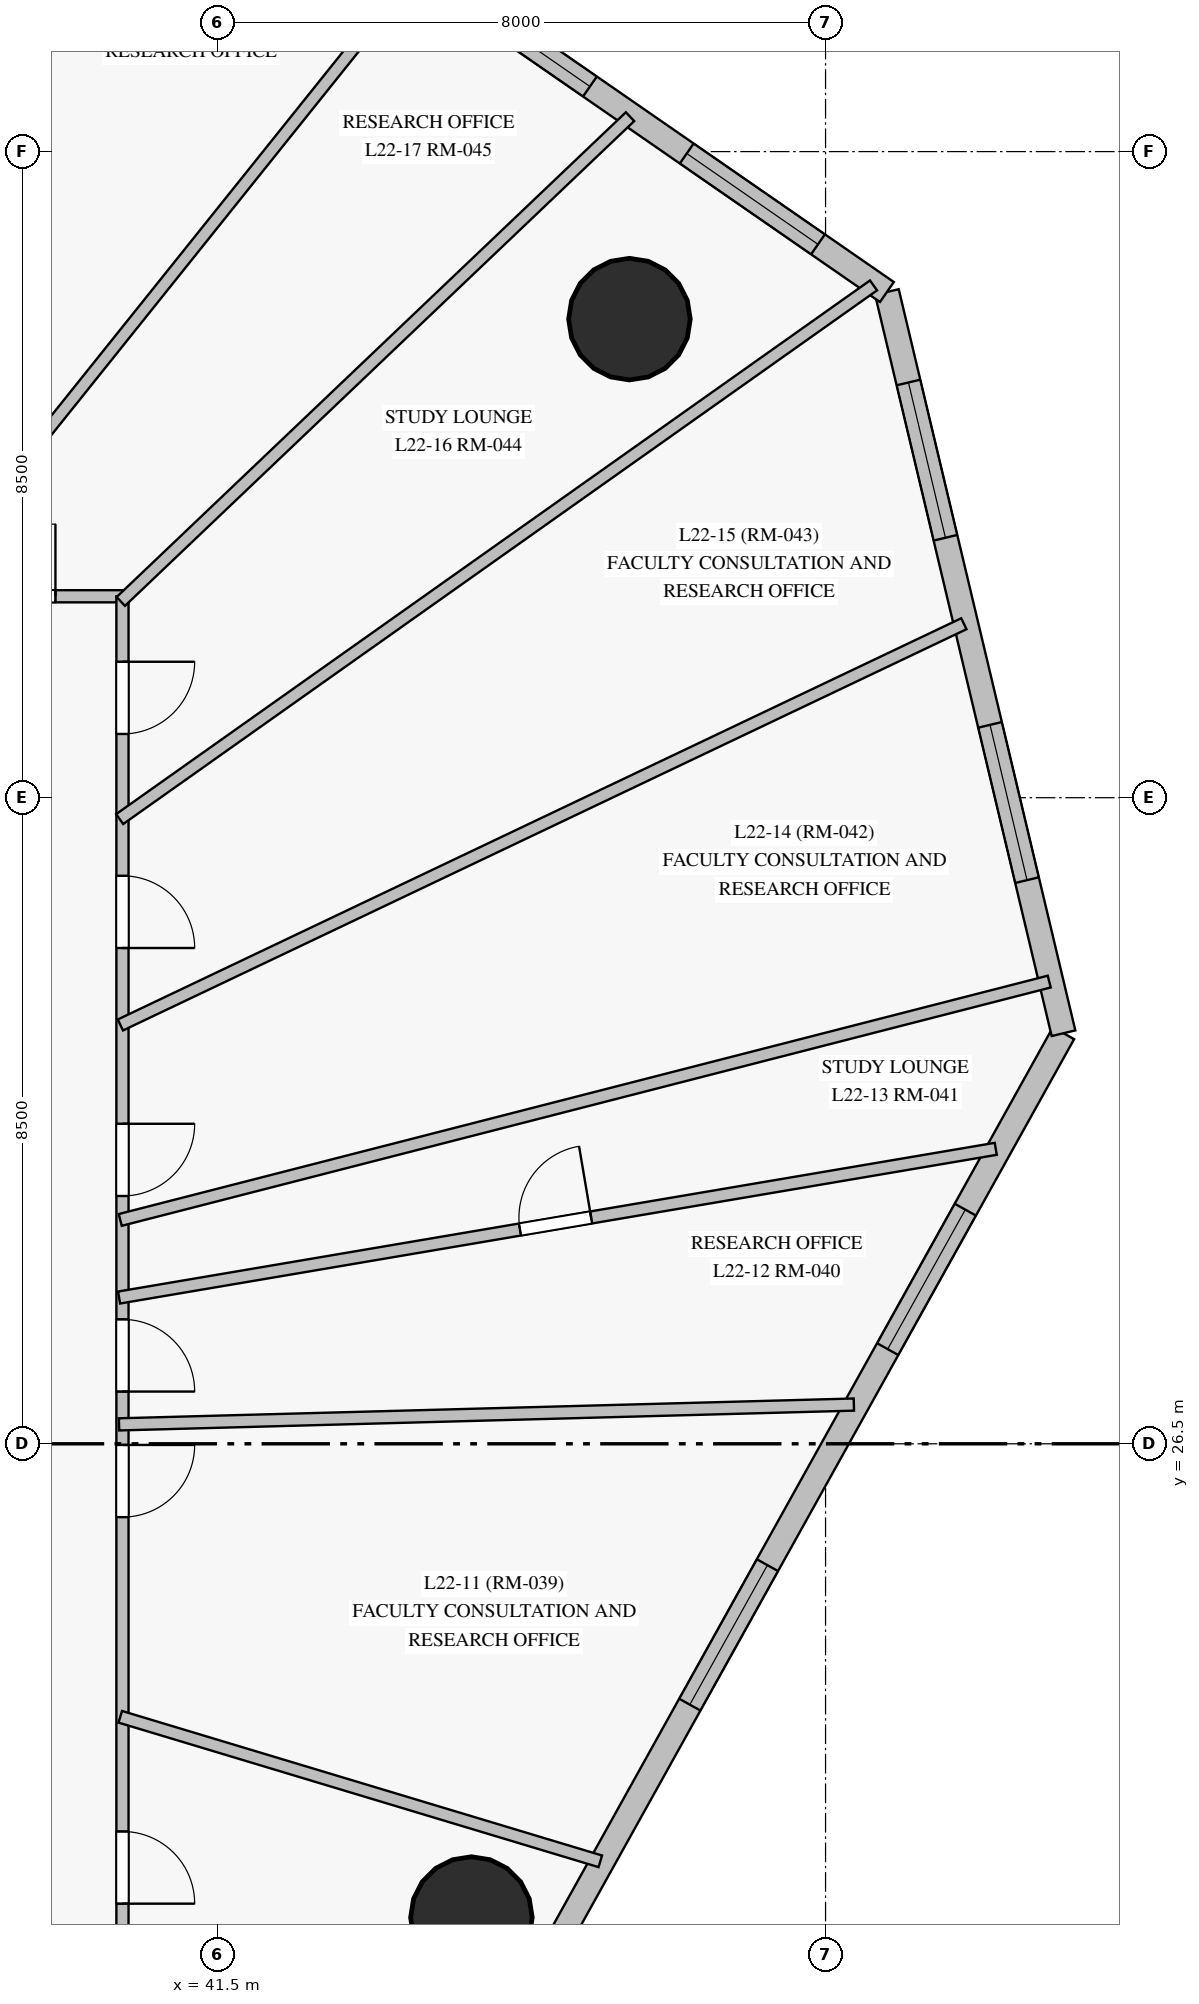
"""IFC4 building model, lengths in metres.
Left out: names, types, materials, properties, quantities, classifications, styles, units other than length and angle.
Written with IfcOpenShell. Run it as: python <this file> out.ifc"""

import sys

from ifc_helpers import new_model, si_unit, direction, frame, frame_2d, origin, origin_with_axes, origin_2d, place, context, subcontext, project, spatial, rectangle, circle, extrude, source, transform, mapped, element, fill, save


model = new_model("IFC4")
c1 = context("Model", 3, precision=1e-05, world=origin(), true_north=direction((0.0, 1.0)))
c2 = subcontext(c1, "Body", "Model", "MODEL_VIEW")
j1 = project(units=[si_unit("LENGTHUNIT", "METRE"), si_unit("PLANEANGLEUNIT", "RADIAN")], contexts=[c1])
p1 = place(None, origin())
s1 = spatial("IfcSite", under=j1, at=p1, CompositionType="ELEMENT")
p2 = place(p1, origin())
s2 = spatial("IfcBuilding", under=s1, at=p2, CompositionType="ELEMENT")
p3 = place(p2, frame((0.0, 0.0, 84.1)))
s3 = spatial("IfcBuildingStorey", under=s2, at=p3, CompositionType="ELEMENT", Elevation=84.1)
m1 = source(origin_with_axes(), c2, "Body", "SweptSolid", [
    extrude(circle(Radius=0.8, at=origin_2d()), origin(), (0.0, 0.0, 1.0), 3.6),
])
for number, where, z_axis, x_axis in (
    (1, (44.841, 20.267, 0.0), (0.0, 0.0, 1.0), (1.0, 0.0, 0.0)),
    (2, (46.92, 41.296, 0.0), (0.0, 0.0, 1.0), (1.0, 0.0, 0.0)),
):
    element("IfcColumn", number, at=place(p3, frame(where, z_axis=z_axis, x_axis=x_axis)), inside=s3, PredefinedType="COLUMN", context=c2, shape_type="MappedRepresentation", body=[
        mapped(m1, transform((0.0, 0.0, 0.0), scale=1.0)),
    ])
p4 = place(p3, frame((45.334, 18.793, 0.0), z_axis=(0.0, 0.0, 1.0), x_axis=(0.486333635772, 0.873773194094, 0.0)))
e3 = element("IfcWall", 3, at=p4, inside=s3, PredefinedType="SOLIDWALL", context=c2, shape_type="SweptSolid", body=[
    extrude(rectangle(XDim=15.002, YDim=0.32, at=frame_2d((7.501, 0.0))), origin(), (0.0, 0.0, 1.0), 3.325),
])
p5 = place(p4, frame((4.893, 0.0, 0.85)))
e4 = element("IfcOpeningElement", 4, at=p5, cuts=e3, PredefinedType="OPENING", context=c2, shape_type="SweptSolid", body=[
    extrude(rectangle(XDim=2.1, YDim=1.95, at=frame_2d((1.05, 0.975))), frame((0.0, 0.17, 0.0), z_axis=(0.0, -1.0, 0.0), x_axis=(1.0, 0.0, 0.0)), (0.0, 0.0, 1.0), 0.34),
])
p6 = place(p4, frame((10.246, 0.0, 0.85)))
e5 = element("IfcOpeningElement", 5, at=p6, cuts=e3, PredefinedType="OPENING", context=c2, shape_type="SweptSolid", body=[
    extrude(rectangle(XDim=2.1, YDim=1.95, at=frame_2d((1.05, 0.975))), frame((0.0, 0.17, 0.0), z_axis=(0.0, -1.0, 0.0), x_axis=(1.0, 0.0, 0.0)), (0.0, 0.0, 1.0), 0.34),
])
p7 = place(p3, frame((52.63, 31.901, 0.0), z_axis=(0.0, 0.0, 1.0), x_axis=(-0.231781859675, 0.97276778808, 0.0)))
e6 = element("IfcWall", 6, at=p7, inside=s3, PredefinedType="SOLIDWALL", context=c2, shape_type="SweptSolid", body=[
    extrude(rectangle(XDim=10.024, YDim=0.32, at=frame_2d((5.012, 0.0))), origin(), (0.0, 0.0, 1.0), 3.325),
])
p8 = place(p7, frame((2.07, 0.0, 0.85)))
e7 = element("IfcOpeningElement", 7, at=p8, cuts=e6, PredefinedType="OPENING", context=c2, shape_type="SweptSolid", body=[
    extrude(rectangle(XDim=2.1, YDim=1.95, at=frame_2d((1.05, 0.975))), frame((0.0, 0.17, 0.0), z_axis=(0.0, -1.0, 0.0), x_axis=(1.0, 0.0, 0.0)), (0.0, 0.0, 1.0), 0.34),
])
p9 = place(p7, frame((6.701, 0.0, 0.85)))
e8 = element("IfcOpeningElement", 8, at=p9, cuts=e6, PredefinedType="OPENING", context=c2, shape_type="SweptSolid", body=[
    extrude(rectangle(XDim=2.1, YDim=1.95, at=frame_2d((1.05, 0.975))), frame((0.0, 0.17, 0.0), z_axis=(0.0, -1.0, 0.0), x_axis=(1.0, 0.0, 0.0)), (0.0, 0.0, 1.0), 0.34),
])
p10 = place(p3, frame((50.307, 41.653, 0.0), z_axis=(0.0, 0.0, 1.0), x_axis=(-0.822301884345, 0.569051501187, 0.0)))
e9 = element("IfcWall", 9, at=p10, inside=s3, PredefinedType="SOLIDWALL", context=c2, shape_type="SweptSolid", body=[
    extrude(rectangle(XDim=12.498, YDim=0.32, at=frame_2d((6.249, 0.0))), origin(), (0.0, 0.0, 1.0), 3.325),
])
p11 = place(p10, frame((1.102, 0.0, 0.85)))
e10 = element("IfcOpeningElement", 10, at=p11, cuts=e9, PredefinedType="OPENING", context=c2, shape_type="SweptSolid", body=[
    extrude(rectangle(XDim=2.1, YDim=1.95, at=frame_2d((1.05, 0.975))), frame((0.0, 0.17, 0.0), z_axis=(0.0, -1.0, 0.0), x_axis=(1.0, 0.0, 0.0)), (0.0, 0.0, 1.0), 0.34),
])
p12 = place(p10, frame((4.751, 0.0, 0.85)))
e11 = element("IfcOpeningElement", 11, at=p12, cuts=e9, PredefinedType="OPENING", context=c2, shape_type="SweptSolid", body=[
    extrude(rectangle(XDim=2.1, YDim=1.95, at=frame_2d((1.05, 0.975))), frame((0.0, 0.17, 0.0), z_axis=(0.0, -1.0, 0.0), x_axis=(1.0, 0.0, 0.0)), (0.0, 0.0, 1.0), 0.34),
])
p13 = place(p10, frame((8.568, 0.0, 0.85)))
e12 = element("IfcOpeningElement", 12, at=p13, cuts=e9, PredefinedType="OPENING", context=c2, shape_type="SweptSolid", body=[
    extrude(rectangle(XDim=2.1, YDim=1.95, at=frame_2d((1.05, 0.975))), frame((0.0, 0.17, 0.0), z_axis=(0.0, -1.0, 0.0), x_axis=(1.0, 0.0, 0.0)), (0.0, 0.0, 1.0), 0.34),
])
p14 = place(p3, frame((10.5, 37.65, 0.0), z_axis=(0.0, 0.0, 1.0), x_axis=(1.0, 0.0, 0.0)))
e13 = element("IfcWall", 13, at=p14, inside=s3, PredefinedType="PARTITIONING", context=c2, shape_type="SweptSolid", body=[
    extrude(rectangle(XDim=29.75, YDim=0.16, at=frame_2d((14.875, 0.0))), origin(), (0.0, 0.0, 1.0), 2.725),
])
p15 = place(p14, frame((27.918, 0.0, 0.0)))
e14 = element("IfcOpeningElement", 14, at=p15, cuts=e13, PredefinedType="OPENING", context=c2, shape_type="SweptSolid", body=[
    extrude(rectangle(XDim=0.95, YDim=2.15, at=frame_2d((0.475, 1.075))), frame((0.0, 0.09, 0.0), z_axis=(0.0, -1.0, 0.0), x_axis=(1.0, 0.0, 0.0)), (0.0, 0.0, 1.0), 0.18),
])
p16 = place(p14, frame((25.129, 0.0, 0.0)))
e15 = element("IfcOpeningElement", 15, at=p16, cuts=e13, PredefinedType="OPENING", context=c2, shape_type="SweptSolid", body=[
    extrude(rectangle(XDim=0.95, YDim=2.15, at=frame_2d((0.475, 1.075))), frame((0.0, 0.09, 0.0), z_axis=(0.0, -1.0, 0.0), x_axis=(1.0, 0.0, 0.0)), (0.0, 0.0, 1.0), 0.18),
])
p17 = place(p14, frame((21.748, 0.0, 0.0)))
e16 = element("IfcOpeningElement", 16, at=p17, cuts=e13, PredefinedType="OPENING", context=c2, shape_type="SweptSolid", body=[
    extrude(rectangle(XDim=0.86, YDim=2.1, at=frame_2d((0.43, 1.05))), frame((0.0, 0.09, 0.0), z_axis=(0.0, -1.0, 0.0), x_axis=(1.0, 0.0, 0.0)), (0.0, 0.0, 1.0), 0.18),
])
p18 = place(p14, frame((20.048, 0.0, 0.0)))
e17 = element("IfcOpeningElement", 17, at=p18, cuts=e13, PredefinedType="OPENING", context=c2, shape_type="SweptSolid", body=[
    extrude(rectangle(XDim=0.95, YDim=2.15, at=frame_2d((0.475, 1.075))), frame((0.0, 0.09, 0.0), z_axis=(0.0, -1.0, 0.0), x_axis=(1.0, 0.0, 0.0)), (0.0, 0.0, 1.0), 0.18),
])
p19 = place(p14, frame((17.722, 0.0, 0.0)))
e18 = element("IfcOpeningElement", 18, at=p19, cuts=e13, PredefinedType="OPENING", context=c2, shape_type="SweptSolid", body=[
    extrude(rectangle(XDim=0.95, YDim=2.15, at=frame_2d((0.475, 1.075))), frame((0.0, 0.09, 0.0), z_axis=(0.0, -1.0, 0.0), x_axis=(1.0, 0.0, 0.0)), (0.0, 0.0, 1.0), 0.18),
])
p20 = place(p14, frame((15.906, 0.0, 0.0)))
e19 = element("IfcOpeningElement", 19, at=p20, cuts=e13, PredefinedType="OPENING", context=c2, shape_type="SweptSolid", body=[
    extrude(rectangle(XDim=0.95, YDim=2.15, at=frame_2d((0.475, 1.075))), frame((0.0, 0.09, 0.0), z_axis=(0.0, -1.0, 0.0), x_axis=(1.0, 0.0, 0.0)), (0.0, 0.0, 1.0), 0.18),
])
p21 = place(p14, frame((12.735, 0.0, 0.0)))
e20 = element("IfcOpeningElement", 20, at=p21, cuts=e13, PredefinedType="OPENING", context=c2, shape_type="SweptSolid", body=[
    extrude(rectangle(XDim=0.95, YDim=2.15, at=frame_2d((0.475, 1.075))), frame((0.0, 0.09, 0.0), z_axis=(0.0, -1.0, 0.0), x_axis=(1.0, 0.0, 0.0)), (0.0, 0.0, 1.0), 0.18),
])
p22 = place(p14, frame((10.11, 0.0, 0.0)))
e21 = element("IfcOpeningElement", 21, at=p22, cuts=e13, PredefinedType="OPENING", context=c2, shape_type="SweptSolid", body=[
    extrude(rectangle(XDim=0.95, YDim=2.15, at=frame_2d((0.475, 1.075))), frame((0.0, 0.09, 0.0), z_axis=(0.0, -1.0, 0.0), x_axis=(1.0, 0.0, 0.0)), (0.0, 0.0, 1.0), 0.18),
])
p23 = place(p14, frame((8.99, 0.0, 0.0)))
e22 = element("IfcOpeningElement", 22, at=p23, cuts=e13, PredefinedType="OPENING", context=c2, shape_type="SweptSolid", body=[
    extrude(rectangle(XDim=0.95, YDim=2.15, at=frame_2d((0.475, 1.075))), frame((0.0, 0.09, 0.0), z_axis=(0.0, -1.0, 0.0), x_axis=(1.0, 0.0, 0.0)), (0.0, 0.0, 1.0), 0.18),
])
p24 = place(p14, frame((7.897, 0.0, 0.0)))
e23 = element("IfcOpeningElement", 23, at=p24, cuts=e13, PredefinedType="OPENING", context=c2, shape_type="SweptSolid", body=[
    extrude(rectangle(XDim=0.95, YDim=2.15, at=frame_2d((0.475, 1.075))), frame((0.0, 0.09, 0.0), z_axis=(0.0, -1.0, 0.0), x_axis=(1.0, 0.0, 0.0)), (0.0, 0.0, 1.0), 0.18),
])
p25 = place(p3, frame((40.25, 37.65, 0.0), z_axis=(0.0, 0.0, 1.0), x_axis=(0.0, -1.0, 0.0)))
e24 = element("IfcWall", 24, at=p25, inside=s3, PredefinedType="PARTITIONING", context=c2, shape_type="SweptSolid", body=[
    extrude(rectangle(XDim=22.3, YDim=0.16, at=frame_2d((11.15, 0.0))), origin(), (0.0, 0.0, 1.0), 2.725),
])
p26 = place(p25, frame((16.25, 0.0, 0.0)))
e25 = element("IfcOpeningElement", 25, at=p26, cuts=e24, PredefinedType="OPENING", context=c2, shape_type="SweptSolid", body=[
    extrude(rectangle(XDim=0.95, YDim=2.15, at=frame_2d((0.475, 1.075))), frame((0.0, 0.09, 0.0), z_axis=(0.0, -1.0, 0.0), x_axis=(1.0, 0.0, 0.0)), (0.0, 0.0, 1.0), 0.18),
])
p27 = place(p25, frame((11.165, 0.0, 0.0)))
e26 = element("IfcOpeningElement", 26, at=p27, cuts=e24, PredefinedType="OPENING", context=c2, shape_type="SweptSolid", body=[
    extrude(rectangle(XDim=0.95, YDim=2.15, at=frame_2d((0.475, 1.075))), frame((0.0, 0.09, 0.0), z_axis=(0.0, -1.0, 0.0), x_axis=(1.0, 0.0, 0.0)), (0.0, 0.0, 1.0), 0.18),
])
p28 = place(p25, frame((9.513, 0.0, 0.0)))
e27 = element("IfcOpeningElement", 27, at=p28, cuts=e24, PredefinedType="OPENING", context=c2, shape_type="SweptSolid", body=[
    extrude(rectangle(XDim=0.95, YDim=2.15, at=frame_2d((0.475, 1.075))), frame((0.0, 0.09, 0.0), z_axis=(0.0, -1.0, 0.0), x_axis=(1.0, 0.0, 0.0)), (0.0, 0.0, 1.0), 0.18),
])
p29 = place(p25, frame((6.94, 0.0, 0.0)))
e28 = element("IfcOpeningElement", 28, at=p29, cuts=e24, PredefinedType="OPENING", context=c2, shape_type="SweptSolid", body=[
    extrude(rectangle(XDim=0.95, YDim=2.15, at=frame_2d((0.475, 1.075))), frame((0.0, 0.09, 0.0), z_axis=(0.0, -1.0, 0.0), x_axis=(1.0, 0.0, 0.0)), (0.0, 0.0, 1.0), 0.18),
])
p30 = place(p25, frame((3.677, 0.0, 0.0)))
e29 = element("IfcOpeningElement", 29, at=p30, cuts=e24, PredefinedType="OPENING", context=c2, shape_type="SweptSolid", body=[
    extrude(rectangle(XDim=0.95, YDim=2.15, at=frame_2d((0.475, 1.075))), frame((0.0, 0.09, 0.0), z_axis=(0.0, -1.0, 0.0), x_axis=(1.0, 0.0, 0.0)), (0.0, 0.0, 1.0), 0.18),
])
p31 = place(p25, frame((0.862, 0.0, 0.0)))
e30 = element("IfcOpeningElement", 30, at=p31, cuts=e24, PredefinedType="OPENING", context=c2, shape_type="SweptSolid", body=[
    extrude(rectangle(XDim=0.95, YDim=2.15, at=frame_2d((0.475, 1.075))), frame((0.0, 0.09, 0.0), z_axis=(0.0, -1.0, 0.0), x_axis=(1.0, 0.0, 0.0)), (0.0, 0.0, 1.0), 0.18),
])
p32 = place(p3, frame((40.221, 29.445, 0.0), z_axis=(0.0, 0.0, 1.0), x_axis=(0.968631987668, 0.248499642788, 0.0)))
e31 = element("IfcWall", 31, at=p32, inside=s3, PredefinedType="PARTITIONING", context=c2, shape_type="SweptSolid", body=[
    extrude(rectangle(XDim=12.618, YDim=0.16, at=frame_2d((6.309, 0.0))), origin(), (0.0, 0.0, 1.0), 3.325),
])
p33 = place(p3, frame((40.223, 32.01, 0.0), z_axis=(0.0, 0.0, 1.0), x_axis=(0.903036353233, 0.429564133443, 0.0)))
e32 = element("IfcWall", 32, at=p33, inside=s3, PredefinedType="PARTITIONING", context=c2, shape_type="SweptSolid", body=[
    extrude(rectangle(XDim=12.288, YDim=0.16, at=frame_2d((6.144, 0.0))), origin(), (0.0, 0.0, 1.0), 3.325),
])
p34 = place(p3, frame((34.719, 37.611, 0.0), z_axis=(0.0, 0.0, 1.0), x_axis=(0.484350809967, 0.874873872558, 0.0)))
e33 = element("IfcWall", 33, at=p34, inside=s3, PredefinedType="PARTITIONING", context=c2, shape_type="SweptSolid", body=[
    extrude(rectangle(XDim=12.229, YDim=0.16, at=frame_2d((6.115, 0.0))), origin(), (0.0, 0.0, 1.0), 3.325),
])
p35 = place(p3, frame((40.213, 34.719, 0.0), z_axis=(0.0, 0.0, 1.0), x_axis=(0.816182001631, 0.577794894589, 0.0)))
e34 = element("IfcWall", 34, at=p35, inside=s3, PredefinedType="PARTITIONING", context=c2, shape_type="SweptSolid", body=[
    extrude(rectangle(XDim=12.151, YDim=0.16, at=frame_2d((6.076, 0.0))), origin(), (0.0, 0.0, 1.0), 3.325),
])
p36 = place(p3, frame((40.206, 28.424, 0.0), z_axis=(0.0, 0.0, 1.0), x_axis=(0.985917744141, 0.167230983337, 0.0)))
e35 = element("IfcWall", 35, at=p36, inside=s3, PredefinedType="PARTITIONING", context=c2, shape_type="SweptSolid", body=[
    extrude(rectangle(XDim=11.698, YDim=0.16, at=frame_2d((5.849, 0.0))), origin(), (0.0, 0.0, 1.0), 3.325),
])
p37 = place(p36, frame((5.349, 0.0, 0.0)))
e36 = element("IfcOpeningElement", 36, at=p37, cuts=e35, PredefinedType="OPENING", context=c2, shape_type="SweptSolid", body=[
    extrude(rectangle(XDim=0.95, YDim=2.15, at=frame_2d((0.475, 1.075))), frame((0.0, 0.09, 0.0), z_axis=(0.0, -1.0, 0.0), x_axis=(1.0, 0.0, 0.0)), (0.0, 0.0, 1.0), 0.18),
])
p38 = place(p3, frame((37.484, 37.615, 0.0), z_axis=(0.0, 0.0, 1.0), x_axis=(0.625362175686, 0.780334639255, 0.0)))
e37 = element("IfcWall", 37, at=p38, inside=s3, PredefinedType="PARTITIONING", context=c2, shape_type="SweptSolid", body=[
    extrude(rectangle(XDim=10.618, YDim=0.16, at=frame_2d((5.309, 0.0))), origin(), (0.0, 0.0, 1.0), 3.325),
])
p39 = place(p3, frame((40.205, 26.756, 0.0), z_axis=(0.0, 0.0, 1.0), x_axis=(0.999637141046, 0.026936708071, 0.0)))
e38 = element("IfcWall", 38, at=p39, inside=s3, PredefinedType="PARTITIONING", context=c2, shape_type="SweptSolid", body=[
    extrude(rectangle(XDim=9.671, YDim=0.16, at=frame_2d((4.835, 0.0))), origin(), (0.0, 0.0, 1.0), 3.325),
])
p40 = place(p3, frame((40.228, 37.582, 0.0), z_axis=(0.0, 0.0, 1.0), x_axis=(0.724299857795, 0.689485109337, 0.0)))
e39 = element("IfcWall", 39, at=p40, inside=s3, PredefinedType="PARTITIONING", context=c2, shape_type="SweptSolid", body=[
    extrude(rectangle(XDim=9.25, YDim=0.16, at=frame_2d((4.625, 0.0))), origin(), (0.0, 0.0, 1.0), 3.325),
])
p41 = place(p3, frame((40.221, 22.908, 0.0), z_axis=(0.0, 0.0, 1.0), x_axis=(0.957544636521, -0.288285048292, 0.0)))
e40 = element("IfcWall", 40, at=p41, inside=s3, PredefinedType="PARTITIONING", context=c2, shape_type="SweptSolid", body=[
    extrude(rectangle(XDim=6.595, YDim=0.16, at=frame_2d((3.298, 0.0))), origin(), (0.0, 0.0, 1.0), 3.325),
])
m2 = source(origin_with_axes(), c2, "Body", "SweptSolid", [
    extrude(rectangle(XDim=2.1, YDim=1.95, at=frame_2d((1.05, 0.975))), frame((0.0, 0.03, 0.0), z_axis=(0.0, -1.0, 0.0), x_axis=(1.0, 0.0, 0.0)), (0.0, 0.0, 1.0), 0.06),
])
p42 = place(p5, origin())
e41 = element("IfcWindow", 41, at=p42, inside=s3, PartitioningType="SINGLE_PANEL", PredefinedType="WINDOW", context=c2, shape_type="MappedRepresentation", body=[
    mapped(m2, transform((0.0, 0.0, 0.0), scale=1.0)),
])
fill(e4, e41)
p43 = place(p6, origin())
e42 = element("IfcWindow", 42, at=p43, inside=s3, PartitioningType="SINGLE_PANEL", PredefinedType="WINDOW", context=c2, shape_type="MappedRepresentation", body=[
    mapped(m2, transform((0.0, 0.0, 0.0), scale=1.0)),
])
fill(e5, e42)
p44 = place(p8, origin())
e43 = element("IfcWindow", 43, at=p44, inside=s3, PartitioningType="SINGLE_PANEL", PredefinedType="WINDOW", context=c2, shape_type="MappedRepresentation", body=[
    mapped(m2, transform((0.0, 0.0, 0.0), scale=1.0)),
])
fill(e7, e43)
p45 = place(p9, origin())
e44 = element("IfcWindow", 44, at=p45, inside=s3, PartitioningType="SINGLE_PANEL", PredefinedType="WINDOW", context=c2, shape_type="MappedRepresentation", body=[
    mapped(m2, transform((0.0, 0.0, 0.0), scale=1.0)),
])
fill(e8, e44)
p46 = place(p11, origin())
e45 = element("IfcWindow", 45, at=p46, inside=s3, PartitioningType="SINGLE_PANEL", PredefinedType="WINDOW", context=c2, shape_type="MappedRepresentation", body=[
    mapped(m2, transform((0.0, 0.0, 0.0), scale=1.0)),
])
fill(e10, e45)
p47 = place(p12, origin())
e46 = element("IfcWindow", 46, at=p47, inside=s3, PartitioningType="SINGLE_PANEL", PredefinedType="WINDOW", context=c2, shape_type="MappedRepresentation", body=[
    mapped(m2, transform((0.0, 0.0, 0.0), scale=1.0)),
])
fill(e11, e46)
m3 = source(origin_with_axes(), c2, "Body", "SweptSolid", [
    extrude(rectangle(XDim=0.95, YDim=2.15, at=frame_2d((0.475, 1.075))), frame((0.0, 0.025, 0.0), z_axis=(0.0, -1.0, 0.0), x_axis=(1.0, 0.0, 0.0)), (0.0, 0.0, 1.0), 0.05),
])
p48 = place(p26, origin())
e47 = element("IfcDoor", 47, at=p48, inside=s3, OperationType="SINGLE_SWING_RIGHT", PredefinedType="DOOR", context=c2, shape_type="MappedRepresentation", body=[
    mapped(m3, transform((0.0, 0.0, 0.0), scale=1.0)),
])
fill(e25, e47)
p49 = place(p27, origin())
e48 = element("IfcDoor", 48, at=p49, inside=s3, OperationType="SINGLE_SWING_LEFT", PredefinedType="DOOR", context=c2, shape_type="MappedRepresentation", body=[
    mapped(m3, transform((0.0, 0.0, 0.0), scale=1.0)),
])
fill(e26, e48)
p50 = place(p28, origin())
e49 = element("IfcDoor", 49, at=p50, inside=s3, OperationType="SINGLE_SWING_RIGHT", PredefinedType="DOOR", context=c2, shape_type="MappedRepresentation", body=[
    mapped(m3, transform((0.0, 0.0, 0.0), scale=1.0)),
])
fill(e27, e49)
p51 = place(p29, origin())
e50 = element("IfcDoor", 50, at=p51, inside=s3, OperationType="SINGLE_SWING_LEFT", PredefinedType="DOOR", context=c2, shape_type="MappedRepresentation", body=[
    mapped(m3, transform((0.0, 0.0, 0.0), scale=1.0)),
])
fill(e28, e50)
p52 = place(p30, origin())
e51 = element("IfcDoor", 51, at=p52, inside=s3, OperationType="SINGLE_SWING_RIGHT", PredefinedType="DOOR", context=c2, shape_type="MappedRepresentation", body=[
    mapped(m3, transform((0.0, 0.0, 0.0), scale=1.0)),
])
fill(e29, e51)
p53 = place(p31, origin())
e52 = element("IfcDoor", 52, at=p53, inside=s3, OperationType="SINGLE_SWING_LEFT", PredefinedType="DOOR", context=c2, shape_type="MappedRepresentation", body=[
    mapped(m3, transform((0.0, 0.0, 0.0), scale=1.0)),
])
fill(e30, e52)
p54 = place(p15, origin())
e53 = element("IfcDoor", 53, at=p54, inside=s3, OperationType="SINGLE_SWING_RIGHT", PredefinedType="DOOR", context=c2, shape_type="MappedRepresentation", body=[
    mapped(m3, transform((0.0, 0.0, 0.0), scale=1.0)),
])
fill(e14, e53)
p55 = place(p37, origin())
e54 = element("IfcDoor", 54, at=p55, inside=s3, OperationType="SINGLE_SWING_RIGHT", PredefinedType="DOOR", context=c2, shape_type="MappedRepresentation", body=[
    mapped(m3, transform((0.0, 0.0, 0.0), scale=1.0)),
])
fill(e36, e54)
save(model, sys.argv[1])
